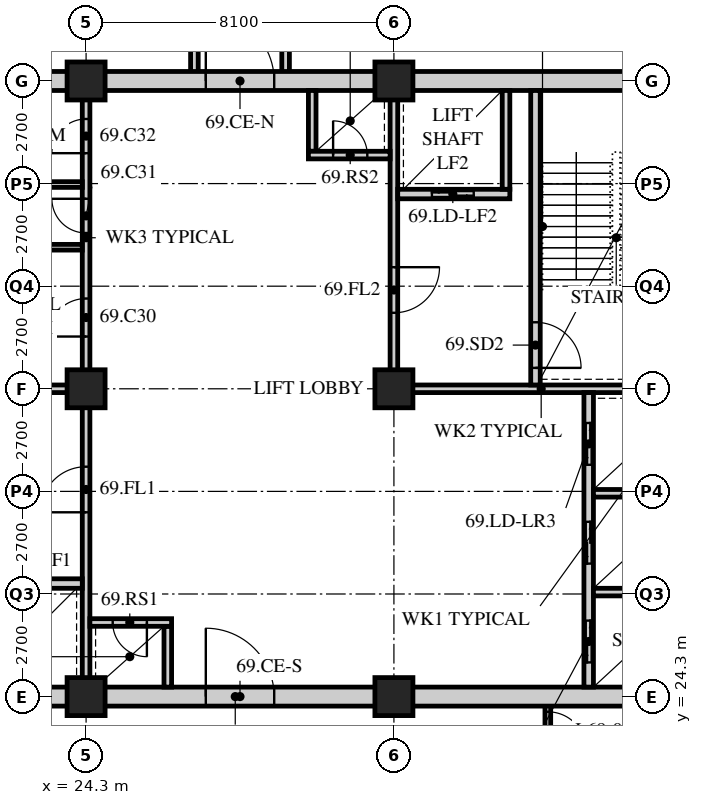
"""IFC4 building model, lengths in metres.
Left out: names, types, materials, properties, quantities, classifications, styles, units other than length and angle.
Written with IfcOpenShell. Run it as: python <this file> out.ifc"""

import sys

from ifc_helpers import new_model, si_unit, direction, frame, frame_2d, origin, origin_2d, place, context, subcontext, project, spatial, rectangle, hollow_rectangle, extrude, element, fill, save


model = new_model("IFC4")
c1 = context("Model", 3, precision=1e-05, world=origin(), true_north=direction((0.0, 1.0)))
c2 = subcontext(c1, "Body", "Model", "MODEL_VIEW")
j1 = project(units=[si_unit("LENGTHUNIT", "METRE"), si_unit("PLANEANGLEUNIT", "RADIAN")], contexts=[c1])
p1 = place(None, origin())
s1 = spatial("IfcSite", under=j1, at=p1, CompositionType="ELEMENT")
p2 = place(p1, origin())
s2 = spatial("IfcBuilding", under=s1, at=p2, CompositionType="ELEMENT")
p3 = place(p2, frame((0.0, 0.0, 269.7)))
s3 = spatial("IfcBuildingStorey", under=s2, at=p3, CompositionType="ELEMENT", Elevation=269.7)
for number, where, z_axis, x_axis in (
    (1, (24.3, 24.3, 0.0), (0.0, 0.0, 1.0), (1.0, 0.0, 0.0)),
    (2, (24.3, 32.4, 0.0), (0.0, 0.0, 1.0), (1.0, 0.0, 0.0)),
    (3, (24.3, 40.5, 0.0), (0.0, 0.0, 1.0), (1.0, 0.0, 0.0)),
    (4, (32.4, 24.3, 0.0), (0.0, 0.0, 1.0), (1.0, 0.0, 0.0)),
    (5, (32.4, 32.4, 0.0), (0.0, 0.0, 1.0), (1.0, 0.0, 0.0)),
    (6, (32.4, 40.5, 0.0), (0.0, 0.0, 1.0), (1.0, 0.0, 0.0)),
):
    element("IfcColumn", number, at=place(p3, frame(where, z_axis=z_axis, x_axis=x_axis)), inside=s3, PredefinedType="COLUMN", context=c2, shape_type="SweptSolid", body=[
        extrude(hollow_rectangle(XDim=1.0, YDim=1.0, WallThickness=0.1, at=origin_2d()), origin(), (0.0, 0.0, 1.0), 3.9),
    ])
for number, where, z_axis, x_axis in (
    (7, (27.15, 40.5, 0.0), (0.0, 0.0, 1.0), (0.0, 1.0, 0.0)),
    (8, (29.55, 40.5, 0.0), (0.0, 0.0, 1.0), (0.0, 1.0, 0.0)),
):
    element("IfcWall", number, at=place(p3, frame(where, z_axis=z_axis, x_axis=x_axis)), inside=s3, PredefinedType="SOLIDWALL", context=c2, shape_type="SweptSolid", body=[
        extrude(rectangle(XDim=10.35, YDim=0.2, at=frame_2d((5.175, 0.0))), origin(), (0.0, 0.0, 1.0), 3.69),
    ])
p4 = place(p3, frame((36.45, 22.5, 0.0), z_axis=(0.0, 0.0, 1.0), x_axis=(0.0, 1.0, 0.0)))
e9 = element("IfcWall", 9, at=p4, inside=s3, PredefinedType="PARTITIONING", context=c2, shape_type="SweptSolid", body=[
    extrude(rectangle(XDim=1.8, YDim=0.15, at=frame_2d((0.9, 0.0))), origin(), (0.0, 0.0, 1.0), 3.69),
])
p5 = place(p4, frame((0.4, 0.0, 0.0)))
e10 = element("IfcOpeningElement", 10, at=p5, cuts=e9, PredefinedType="OPENING", context=c2, shape_type="SweptSolid", body=[
    extrude(rectangle(XDim=1.0, YDim=2.1, at=frame_2d((0.5, 1.05))), frame((0.0, 0.085, 0.0), z_axis=(0.0, -1.0, 0.0), x_axis=(1.0, 0.0, 0.0)), (0.0, 0.0, 1.0), 0.17),
])
p6 = place(p3, frame((15.95, 24.3, 0.0), z_axis=(0.0, 0.0, 1.0), x_axis=(1.0, 0.0, 0.0)))
e11 = element("IfcWall", 11, at=p6, inside=s3, PredefinedType="SOLIDWALL", context=c2, shape_type="SweptSolid", body=[
    extrude(rectangle(XDim=24.55, YDim=0.5, at=frame_2d((12.275, 0.0))), origin(), (0.0, 0.0, 1.0), 3.04),
])
p7 = place(p6, frame((11.5, 0.0, 0.0)))
e12 = element("IfcOpeningElement", 12, at=p7, cuts=e11, PredefinedType="OPENING", context=c2, shape_type="SweptSolid", body=[
    extrude(rectangle(XDim=1.8, YDim=2.4, at=frame_2d((0.9, 1.2))), frame((0.0, 0.26, 0.0), z_axis=(0.0, -1.0, 0.0), x_axis=(1.0, 0.0, 0.0)), (0.0, 0.0, 1.0), 0.52),
])
p8 = place(p3, frame((15.95, 40.5, 0.0), z_axis=(0.0, 0.0, 1.0), x_axis=(1.0, 0.0, 0.0)))
e13 = element("IfcWall", 13, at=p8, inside=s3, PredefinedType="SOLIDWALL", context=c2, shape_type="SweptSolid", body=[
    extrude(rectangle(XDim=24.55, YDim=0.5, at=frame_2d((12.275, 0.0))), origin(), (0.0, 0.0, 1.0), 3.04),
])
p9 = place(p8, frame((11.5, 0.0, 0.0)))
e14 = element("IfcOpeningElement", 14, at=p9, cuts=e13, PredefinedType="OPENING", context=c2, shape_type="SweptSolid", body=[
    extrude(rectangle(XDim=1.8, YDim=2.4, at=frame_2d((0.9, 1.2))), frame((0.0, 0.26, 0.0), z_axis=(0.0, -1.0, 0.0), x_axis=(1.0, 0.0, 0.0)), (0.0, 0.0, 1.0), 0.52),
])
p10 = place(p3, frame((16.45, 32.4, 0.0), z_axis=(0.0, 0.0, 1.0), x_axis=(1.0, 0.0, 0.0)))
e15 = element("IfcWall", 15, at=p10, inside=s3, PredefinedType="SOLIDWALL", context=c2, shape_type="SweptSolid", body=[
    extrude(rectangle(XDim=7.95, YDim=0.2, at=frame_2d((3.975, 0.0))), origin(), (0.0, 0.0, 1.0), 3.078),
])
p11 = place(p3, frame((24.3, 24.55, 0.0), z_axis=(0.0, 0.0, 1.0), x_axis=(0.0, 1.0, 0.0)))
e16 = element("IfcWall", 16, at=p11, inside=s3, PredefinedType="SOLIDWALL", context=c2, shape_type="SweptSolid", body=[
    extrude(rectangle(XDim=7.75, YDim=0.2, at=frame_2d((3.875, 0.0))), origin(), (0.0, 0.0, 1.0), 3.078),
])
p12 = place(p11, frame((4.6, 0.0, 0.0)))
e17 = element("IfcOpeningElement", 17, at=p12, cuts=e16, PredefinedType="OPENING", context=c2, shape_type="SweptSolid", body=[
    extrude(rectangle(XDim=1.2, YDim=2.1, at=frame_2d((0.6, 1.05))), frame((0.0, 0.11, 0.0), z_axis=(0.0, -1.0, 0.0), x_axis=(1.0, 0.0, 0.0)), (0.0, 0.0, 1.0), 0.22),
])
p13 = place(p3, frame((21.25, 27.275, 0.0), z_axis=(0.0, 0.0, 1.0), x_axis=(1.0, 0.0, 0.0)))
e18 = element("IfcWall", 18, at=p13, inside=s3, PredefinedType="SOLIDWALL", context=c2, shape_type="SweptSolid", body=[
    extrude(rectangle(XDim=2.95, YDim=0.25, at=frame_2d((1.475, 0.0))), origin(), (0.0, 0.0, 1.0), 3.69),
])
p14 = place(p13, frame((0.95, 0.0, 0.0)))
e19 = element("IfcOpeningElement", 19, at=p14, cuts=e18, PredefinedType="OPENING", context=c2, shape_type="SweptSolid", body=[
    extrude(rectangle(XDim=1.1, YDim=2.4, at=frame_2d((0.55, 1.2))), frame((0.0, 0.135, 0.0), z_axis=(0.0, -1.0, 0.0), x_axis=(1.0, 0.0, 0.0)), (0.0, 0.0, 1.0), 0.27),
])
p15 = place(p3, frame((26.45, 24.55, 0.0), z_axis=(0.0, 0.0, 1.0), x_axis=(0.0, 1.0, 0.0)))
e20 = element("IfcWall", 20, at=p15, inside=s3, PredefinedType="SOLIDWALL", context=c2, shape_type="SweptSolid", body=[
    extrude(rectangle(XDim=1.6, YDim=0.2, at=frame_2d((0.8, 0.0))), origin(), (0.0, 0.0, 1.0), 3.69),
])
p16 = place(p3, frame((24.4, 26.25, 0.0), z_axis=(0.0, 0.0, 1.0), x_axis=(1.0, 0.0, 0.0)))
e21 = element("IfcWall", 21, at=p16, inside=s3, PredefinedType="SOLIDWALL", context=c2, shape_type="SweptSolid", body=[
    extrude(rectangle(XDim=2.15, YDim=0.2, at=frame_2d((1.075, 0.0))), origin(), (0.0, 0.0, 1.0), 3.69),
])
p17 = place(p16, frame((0.6, 0.0, 0.0)))
e22 = element("IfcOpeningElement", 22, at=p17, cuts=e21, PredefinedType="OPENING", context=c2, shape_type="SweptSolid", body=[
    extrude(rectangle(XDim=0.9, YDim=2.1, at=frame_2d((0.45, 1.05))), frame((0.0, 0.11, 0.0), z_axis=(0.0, -1.0, 0.0), x_axis=(1.0, 0.0, 0.0)), (0.0, 0.0, 1.0), 0.22),
])
p18 = place(p3, frame((32.3, 32.4, 0.0), z_axis=(0.0, 0.0, 1.0), x_axis=(1.0, 0.0, 0.0)))
e23 = element("IfcWall", 23, at=p18, inside=s3, PredefinedType="SOLIDWALL", context=c2, shape_type="SweptSolid", body=[
    extrude(rectangle(XDim=7.95, YDim=0.2, at=frame_2d((3.975, 0.0))), origin(), (0.0, 0.0, 1.0), 3.078),
])
p19 = place(p3, frame((32.4, 32.5, 0.0), z_axis=(0.0, 0.0, 1.0), x_axis=(0.0, 1.0, 0.0)))
e24 = element("IfcWall", 24, at=p19, inside=s3, PredefinedType="SOLIDWALL", context=c2, shape_type="SweptSolid", body=[
    extrude(rectangle(XDim=7.75, YDim=0.2, at=frame_2d((3.875, 0.0))), origin(), (0.0, 0.0, 1.0), 3.078),
])
p20 = place(p19, frame((1.9, 0.0, 0.0)))
e25 = element("IfcOpeningElement", 25, at=p20, cuts=e24, PredefinedType="OPENING", context=c2, shape_type="SweptSolid", body=[
    extrude(rectangle(XDim=1.2, YDim=2.1, at=frame_2d((0.6, 1.05))), frame((0.0, 0.11, 0.0), z_axis=(0.0, -1.0, 0.0), x_axis=(1.0, 0.0, 0.0)), (0.0, 0.0, 1.0), 0.22),
])
p21 = place(p3, frame((37.525, 24.55, 0.0), z_axis=(0.0, 0.0, 1.0), x_axis=(0.0, 1.0, 0.0)))
e26 = element("IfcWall", 26, at=p21, inside=s3, PredefinedType="SOLIDWALL", context=c2, shape_type="SweptSolid", body=[
    extrude(rectangle(XDim=7.75, YDim=0.25, at=frame_2d((3.875, 0.0))), origin(), (0.0, 0.0, 1.0), 3.69),
])
p22 = place(p21, frame((0.65, 0.0, 0.0)))
e27 = element("IfcOpeningElement", 27, at=p22, cuts=e26, PredefinedType="OPENING", context=c2, shape_type="SweptSolid", body=[
    extrude(rectangle(XDim=1.1, YDim=2.4, at=frame_2d((0.55, 1.2))), frame((0.0, 0.135, 0.0), z_axis=(0.0, -1.0, 0.0), x_axis=(1.0, 0.0, 0.0)), (0.0, 0.0, 1.0), 0.27),
])
p23 = place(p21, frame((3.25, 0.0, 0.0)))
e28 = element("IfcOpeningElement", 28, at=p23, cuts=e26, PredefinedType="OPENING", context=c2, shape_type="SweptSolid", body=[
    extrude(rectangle(XDim=1.1, YDim=2.4, at=frame_2d((0.55, 1.2))), frame((0.0, 0.135, 0.0), z_axis=(0.0, -1.0, 0.0), x_axis=(1.0, 0.0, 0.0)), (0.0, 0.0, 1.0), 0.27),
])
p24 = place(p21, frame((5.85, 0.0, 0.0)))
e29 = element("IfcOpeningElement", 29, at=p24, cuts=e26, PredefinedType="OPENING", context=c2, shape_type="SweptSolid", body=[
    extrude(rectangle(XDim=1.1, YDim=2.4, at=frame_2d((0.55, 1.2))), frame((0.0, 0.135, 0.0), z_axis=(0.0, -1.0, 0.0), x_axis=(1.0, 0.0, 0.0)), (0.0, 0.0, 1.0), 0.27),
])
for number, where, z_axis, x_axis in (
    (30, (37.65, 27.05, 0.0), (0.0, 0.0, 1.0), (1.0, 0.0, 0.0)),
    (31, (37.65, 29.65, 0.0), (0.0, 0.0, 1.0), (1.0, 0.0, 0.0)),
):
    element("IfcWall", number, at=place(p3, frame(where, z_axis=z_axis, x_axis=x_axis)), inside=s3, PredefinedType="SOLIDWALL", context=c2, shape_type="SweptSolid", body=[
        extrude(rectangle(XDim=2.6, YDim=0.2, at=frame_2d((1.3, 0.0))), origin(), (0.0, 0.0, 1.0), 3.69),
    ])
p25 = place(p3, frame((36.125, 32.5, 0.0), z_axis=(0.0, 0.0, 1.0), x_axis=(0.0, 1.0, 0.0)))
e32 = element("IfcWall", 32, at=p25, inside=s3, PredefinedType="SOLIDWALL", context=c2, shape_type="SweptSolid", body=[
    extrude(rectangle(XDim=7.75, YDim=0.25, at=frame_2d((3.875, 0.0))), origin(), (0.0, 0.0, 1.0), 3.69),
])
p26 = place(p25, frame((0.45, 0.0, 0.0)))
e33 = element("IfcOpeningElement", 33, at=p26, cuts=e32, PredefinedType="OPENING", context=c2, shape_type="SweptSolid", body=[
    extrude(rectangle(XDim=1.2, YDim=2.1, at=frame_2d((0.6, 1.05))), frame((0.0, 0.135, 0.0), z_axis=(0.0, -1.0, 0.0), x_axis=(1.0, 0.0, 0.0)), (0.0, 0.0, 1.0), 0.27),
])
p27 = place(p3, frame((32.5, 37.525, 0.0), z_axis=(0.0, 0.0, 1.0), x_axis=(1.0, 0.0, 0.0)))
e34 = element("IfcWall", 34, at=p27, inside=s3, PredefinedType="SOLIDWALL", context=c2, shape_type="SweptSolid", body=[
    extrude(rectangle(XDim=2.95, YDim=0.25, at=frame_2d((1.475, 0.0))), origin(), (0.0, 0.0, 1.0), 3.69),
])
p28 = place(p27, frame((0.9, 0.0, 0.0)))
e35 = element("IfcOpeningElement", 35, at=p28, cuts=e34, PredefinedType="OPENING", context=c2, shape_type="SweptSolid", body=[
    extrude(rectangle(XDim=1.1, YDim=2.4, at=frame_2d((0.55, 1.2))), frame((0.0, 0.135, 0.0), z_axis=(0.0, -1.0, 0.0), x_axis=(1.0, 0.0, 0.0)), (0.0, 0.0, 1.0), 0.27),
])
p29 = place(p3, frame((35.35, 37.65, 0.0), z_axis=(0.0, 0.0, 1.0), x_axis=(0.0, 1.0, 0.0)))
e36 = element("IfcWall", 36, at=p29, inside=s3, PredefinedType="SOLIDWALL", context=c2, shape_type="SweptSolid", body=[
    extrude(rectangle(XDim=2.6, YDim=0.2, at=frame_2d((1.3, 0.0))), origin(), (0.0, 0.0, 1.0), 3.69),
])
p30 = place(p3, frame((30.25, 38.65, 0.0), z_axis=(0.0, 0.0, 1.0), x_axis=(0.0, 1.0, 0.0)))
e37 = element("IfcWall", 37, at=p30, inside=s3, PredefinedType="SOLIDWALL", context=c2, shape_type="SweptSolid", body=[
    extrude(rectangle(XDim=1.6, YDim=0.2, at=frame_2d((0.8, 0.0))), origin(), (0.0, 0.0, 1.0), 3.69),
])
p31 = place(p3, frame((30.15, 38.55, 0.0), z_axis=(0.0, 0.0, 1.0), x_axis=(1.0, 0.0, 0.0)))
e38 = element("IfcWall", 38, at=p31, inside=s3, PredefinedType="SOLIDWALL", context=c2, shape_type="SweptSolid", body=[
    extrude(rectangle(XDim=2.15, YDim=0.2, at=frame_2d((1.075, 0.0))), origin(), (0.0, 0.0, 1.0), 3.69),
])
p32 = place(p31, frame((0.65, 0.0, 0.0)))
e39 = element("IfcOpeningElement", 39, at=p32, cuts=e38, PredefinedType="OPENING", context=c2, shape_type="SweptSolid", body=[
    extrude(rectangle(XDim=0.9, YDim=2.1, at=frame_2d((0.45, 1.05))), frame((0.0, 0.11, 0.0), z_axis=(0.0, -1.0, 0.0), x_axis=(1.0, 0.0, 0.0)), (0.0, 0.0, 1.0), 0.22),
])
p33 = place(p3, frame((24.3, 32.5, 0.0), z_axis=(0.0, 0.0, 1.0), x_axis=(0.0, 1.0, 0.0)))
e40 = element("IfcWall", 40, at=p33, inside=s3, PredefinedType="PARTITIONING", context=c2, shape_type="SweptSolid", body=[
    extrude(rectangle(XDim=7.75, YDim=0.2, at=frame_2d((3.875, 0.0))), origin(), (0.0, 0.0, 1.0), 3.078),
])
p34 = place(p33, frame((1.275, 0.0, 0.0)))
e41 = element("IfcOpeningElement", 41, at=p34, cuts=e40, PredefinedType="OPENING", context=c2, shape_type="SweptSolid", body=[
    extrude(rectangle(XDim=1.0, YDim=2.1, at=frame_2d((0.5, 1.05))), frame((0.0, 0.11, 0.0), z_axis=(0.0, -1.0, 0.0), x_axis=(1.0, 0.0, 0.0)), (0.0, 0.0, 1.0), 0.22),
])
p35 = place(p33, frame((4.0, 0.0, 0.0)))
e42 = element("IfcOpeningElement", 42, at=p35, cuts=e40, PredefinedType="OPENING", context=c2, shape_type="SweptSolid", body=[
    extrude(rectangle(XDim=0.9, YDim=2.1, at=frame_2d((0.45, 1.05))), frame((0.0, 0.11, 0.0), z_axis=(0.0, -1.0, 0.0), x_axis=(1.0, 0.0, 0.0)), (0.0, 0.0, 1.0), 0.22),
])
p36 = place(p33, frame((6.1, 0.0, 0.0)))
e43 = element("IfcOpeningElement", 43, at=p36, cuts=e40, PredefinedType="OPENING", context=c2, shape_type="SweptSolid", body=[
    extrude(rectangle(XDim=0.9, YDim=2.1, at=frame_2d((0.45, 1.05))), frame((0.0, 0.11, 0.0), z_axis=(0.0, -1.0, 0.0), x_axis=(1.0, 0.0, 0.0)), (0.0, 0.0, 1.0), 0.22),
])
for number, where, z_axis, x_axis in (
    (44, (21.05, 36.125, 0.0), (0.0, 0.0, 1.0), (1.0, 0.0, 0.0)),
    (45, (21.05, 37.775, 0.0), (0.0, 0.0, 1.0), (1.0, 0.0, 0.0)),
):
    element("IfcWall", number, at=place(p3, frame(where, z_axis=z_axis, x_axis=x_axis)), inside=s3, PredefinedType="PARTITIONING", context=c2, shape_type="SweptSolid", body=[
        extrude(rectangle(XDim=3.15, YDim=0.15, at=frame_2d((1.575, 0.0))), origin(), (0.0, 0.0, 1.0), 3.69),
    ])
p37 = place(p5, origin())
e46 = element("IfcDoor", 46, at=p37, inside=s3, OperationType="SINGLE_SWING_RIGHT", PredefinedType="DOOR", context=c2, shape_type="SweptSolid", body=[
    extrude(rectangle(XDim=1.0, YDim=2.1, at=frame_2d((0.5, 1.05))), frame((0.0, 0.025, 0.0), z_axis=(0.0, -1.0, 0.0), x_axis=(1.0, 0.0, 0.0)), (0.0, 0.0, 1.0), 0.05),
])
fill(e10, e46)
p38 = place(p34, origin())
e47 = element("IfcDoor", 47, at=p38, inside=s3, OperationType="SINGLE_SWING_LEFT", PredefinedType="DOOR", context=c2, shape_type="SweptSolid", body=[
    extrude(rectangle(XDim=1.0, YDim=2.1, at=frame_2d((0.5, 1.05))), frame((0.0, 0.025, 0.0), z_axis=(0.0, -1.0, 0.0), x_axis=(1.0, 0.0, 0.0)), (0.0, 0.0, 1.0), 0.05),
])
fill(e41, e47)
p39 = place(p35, origin())
e48 = element("IfcDoor", 48, at=p39, inside=s3, OperationType="SINGLE_SWING_RIGHT", PredefinedType="DOOR", context=c2, shape_type="SweptSolid", body=[
    extrude(rectangle(XDim=0.9, YDim=2.1, at=frame_2d((0.45, 1.05))), frame((0.0, 0.025, 0.0), z_axis=(0.0, -1.0, 0.0), x_axis=(1.0, 0.0, 0.0)), (0.0, 0.0, 1.0), 0.05),
])
fill(e42, e48)
p40 = place(p36, origin())
e49 = element("IfcDoor", 49, at=p40, inside=s3, OperationType="SINGLE_SWING_LEFT", PredefinedType="DOOR", context=c2, shape_type="SweptSolid", body=[
    extrude(rectangle(XDim=0.9, YDim=2.1, at=frame_2d((0.45, 1.05))), frame((0.0, 0.025, 0.0), z_axis=(0.0, -1.0, 0.0), x_axis=(1.0, 0.0, 0.0)), (0.0, 0.0, 1.0), 0.05),
])
fill(e43, e49)
p41 = place(p12, origin())
e50 = element("IfcDoor", 50, at=p41, inside=s3, OperationType="SINGLE_SWING_LEFT", PredefinedType="DOOR", context=c2, shape_type="SweptSolid", body=[
    extrude(rectangle(XDim=1.2, YDim=2.1, at=frame_2d((0.6, 1.05))), frame((0.0, 0.025, 0.0), z_axis=(0.0, -1.0, 0.0), x_axis=(1.0, 0.0, 0.0)), (0.0, 0.0, 1.0), 0.05),
])
fill(e17, e50)
p42 = place(p17, origin())
e51 = element("IfcDoor", 51, at=p42, inside=s3, OperationType="SINGLE_SWING_LEFT", PredefinedType="DOOR", context=c2, shape_type="SweptSolid", body=[
    extrude(rectangle(XDim=0.9, YDim=2.1, at=frame_2d((0.45, 1.05))), frame((0.0, 0.025, 0.0), z_axis=(0.0, -1.0, 0.0), x_axis=(1.0, 0.0, 0.0)), (0.0, 0.0, 1.0), 0.05),
])
fill(e22, e51)
p43 = place(p26, origin())
e52 = element("IfcDoor", 52, at=p43, inside=s3, OperationType="SINGLE_SWING_RIGHT", PredefinedType="DOOR", context=c2, shape_type="SweptSolid", body=[
    extrude(rectangle(XDim=1.2, YDim=2.1, at=frame_2d((0.6, 1.05))), frame((0.0, 0.025, 0.0), z_axis=(0.0, -1.0, 0.0), x_axis=(1.0, 0.0, 0.0)), (0.0, 0.0, 1.0), 0.05),
])
fill(e33, e52)
p44 = place(p20, origin())
e53 = element("IfcDoor", 53, at=p44, inside=s3, OperationType="SINGLE_SWING_LEFT", PredefinedType="DOOR", context=c2, shape_type="SweptSolid", body=[
    extrude(rectangle(XDim=1.2, YDim=2.1, at=frame_2d((0.6, 1.05))), frame((0.0, 0.025, 0.0), z_axis=(0.0, -1.0, 0.0), x_axis=(1.0, 0.0, 0.0)), (0.0, 0.0, 1.0), 0.05),
])
fill(e25, e53)
p45 = place(p32, origin())
e54 = element("IfcDoor", 54, at=p45, inside=s3, OperationType="SINGLE_SWING_LEFT", PredefinedType="DOOR", context=c2, shape_type="SweptSolid", body=[
    extrude(rectangle(XDim=0.9, YDim=2.1, at=frame_2d((0.45, 1.05))), frame((0.0, 0.025, 0.0), z_axis=(0.0, -1.0, 0.0), x_axis=(1.0, 0.0, 0.0)), (0.0, 0.0, 1.0), 0.05),
])
fill(e39, e54)
p46 = place(p22, origin())
e55 = element("IfcDoor", 55, at=p46, inside=s3, OperationType="DOUBLE_DOOR_SLIDING", PredefinedType="DOOR", context=c2, shape_type="SweptSolid", body=[
    extrude(rectangle(XDim=1.1, YDim=2.4, at=frame_2d((0.55, 1.2))), frame((0.0, 0.025, 0.0), z_axis=(0.0, -1.0, 0.0), x_axis=(1.0, 0.0, 0.0)), (0.0, 0.0, 1.0), 0.05),
])
fill(e27, e55)
p47 = place(p23, origin())
e56 = element("IfcDoor", 56, at=p47, inside=s3, OperationType="DOUBLE_DOOR_SLIDING", PredefinedType="DOOR", context=c2, shape_type="SweptSolid", body=[
    extrude(rectangle(XDim=1.1, YDim=2.4, at=frame_2d((0.55, 1.2))), frame((0.0, 0.025, 0.0), z_axis=(0.0, -1.0, 0.0), x_axis=(1.0, 0.0, 0.0)), (0.0, 0.0, 1.0), 0.05),
])
fill(e28, e56)
p48 = place(p24, origin())
e57 = element("IfcDoor", 57, at=p48, inside=s3, OperationType="DOUBLE_DOOR_SLIDING", PredefinedType="DOOR", context=c2, shape_type="SweptSolid", body=[
    extrude(rectangle(XDim=1.1, YDim=2.4, at=frame_2d((0.55, 1.2))), frame((0.0, 0.025, 0.0), z_axis=(0.0, -1.0, 0.0), x_axis=(1.0, 0.0, 0.0)), (0.0, 0.0, 1.0), 0.05),
])
fill(e29, e57)
p49 = place(p28, origin())
e58 = element("IfcDoor", 58, at=p49, inside=s3, OperationType="DOUBLE_DOOR_SLIDING", PredefinedType="DOOR", context=c2, shape_type="SweptSolid", body=[
    extrude(rectangle(XDim=1.1, YDim=2.4, at=frame_2d((0.55, 1.2))), frame((0.0, 0.025, 0.0), z_axis=(0.0, -1.0, 0.0), x_axis=(1.0, 0.0, 0.0)), (0.0, 0.0, 1.0), 0.05),
])
fill(e35, e58)
p50 = place(p7, origin())
e59 = element("IfcDoor", 59, at=p50, inside=s3, OperationType="DOUBLE_DOOR_SINGLE_SWING", PredefinedType="DOOR", context=c2, shape_type="SweptSolid", body=[
    extrude(rectangle(XDim=1.8, YDim=2.4, at=frame_2d((0.9, 1.2))), frame((0.0, 0.025, 0.0), z_axis=(0.0, -1.0, 0.0), x_axis=(1.0, 0.0, 0.0)), (0.0, 0.0, 1.0), 0.05),
])
fill(e12, e59)
p51 = place(p9, origin())
e60 = element("IfcDoor", 60, at=p51, inside=s3, OperationType="DOUBLE_DOOR_SINGLE_SWING", PredefinedType="DOOR", context=c2, shape_type="SweptSolid", body=[
    extrude(rectangle(XDim=1.8, YDim=2.4, at=frame_2d((0.9, 1.2))), frame((0.0, 0.025, 0.0), z_axis=(0.0, -1.0, 0.0), x_axis=(1.0, 0.0, 0.0)), (0.0, 0.0, 1.0), 0.05),
])
fill(e14, e60)
save(model, sys.argv[1])
